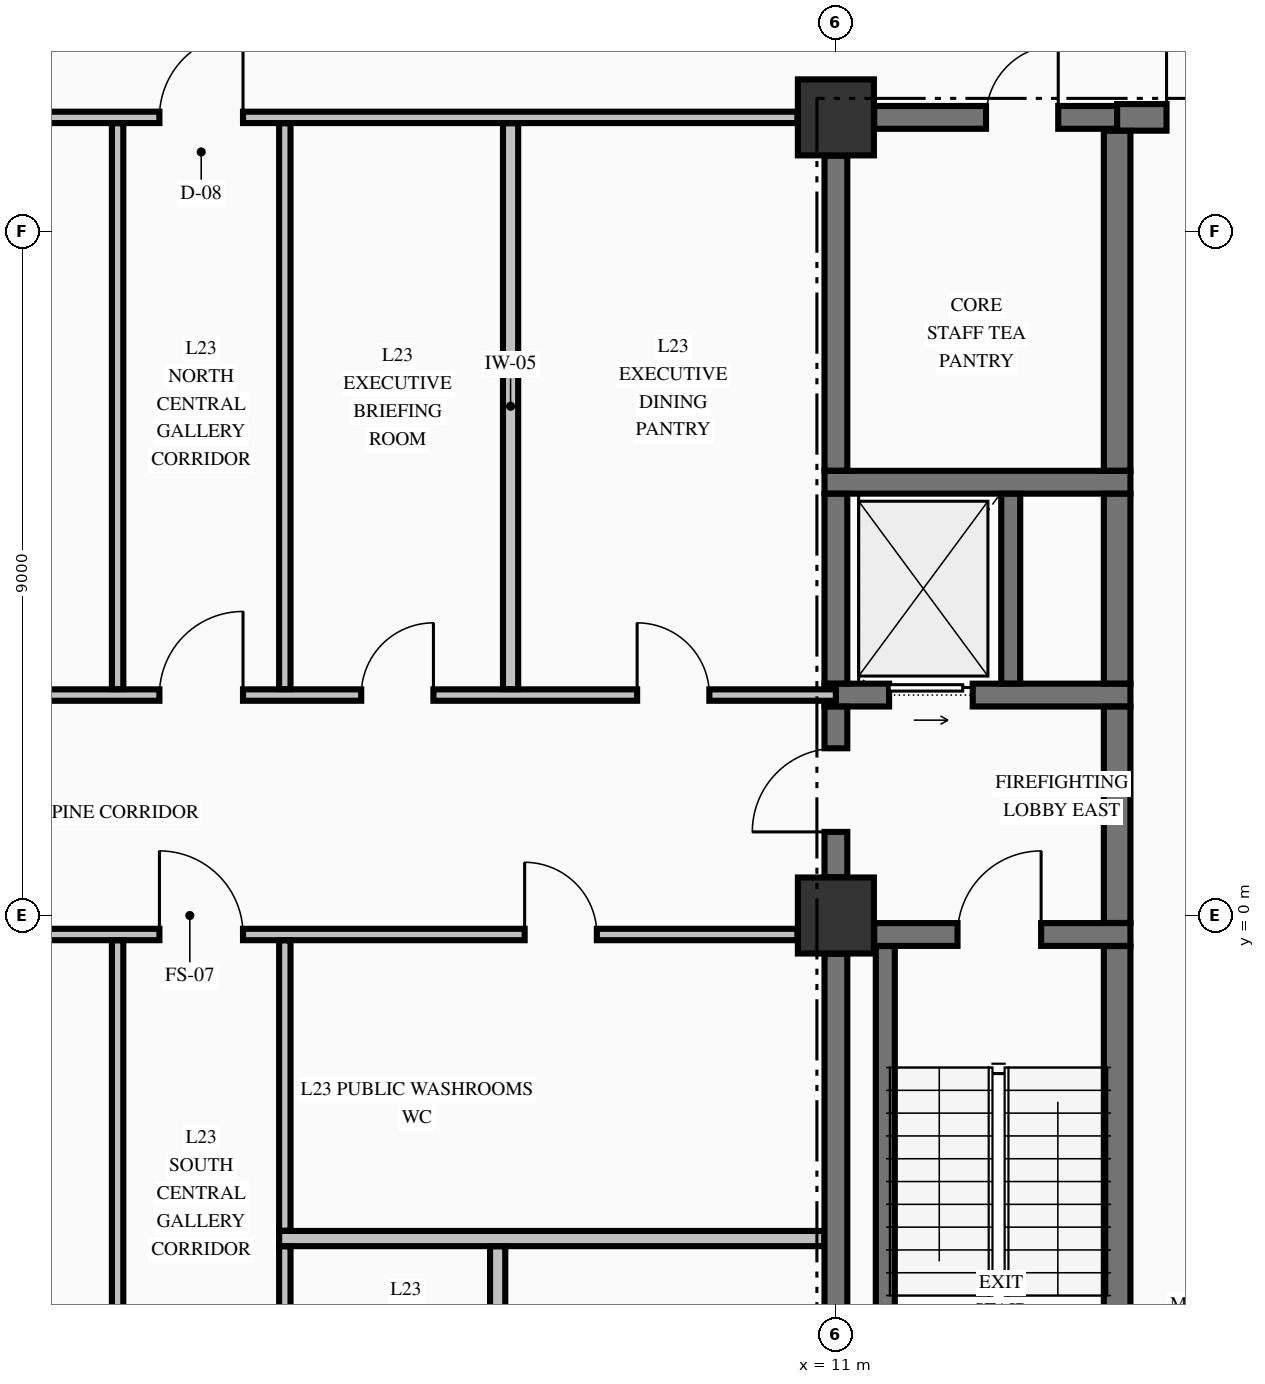
"""IFC4 building model, lengths in metres.
Left out: names, types, materials, properties, quantities, classifications, styles, units other than length and angle.
Written with IfcOpenShell. Run it as: python <this file> out.ifc"""

import sys

from ifc_helpers import new_model, si_unit, direction, frame, frame_2d, origin, origin_2d, place, context, subcontext, project, spatial, rectangle, extrude, element, fill, save


model = new_model("IFC4")
c1 = context("Model", 3, precision=1e-05, world=origin(), true_north=direction((0.0, 1.0)))
c2 = subcontext(c1, "Body", "Model", "MODEL_VIEW")
j1 = project(units=[si_unit("LENGTHUNIT", "METRE"), si_unit("PLANEANGLEUNIT", "RADIAN")], contexts=[c1])
p1 = place(None, origin())
s1 = spatial("IfcSite", under=j1, at=p1, CompositionType="ELEMENT")
p2 = place(p1, origin())
s2 = spatial("IfcBuilding", under=s1, at=p2, CompositionType="ELEMENT")
p3 = place(p2, frame((0.0, 0.0, 94.93)))
s3 = spatial("IfcBuildingStorey", under=s2, at=p3, CompositionType="ELEMENT", Elevation=94.93)
for number, where, z_axis, x_axis in (
    (1, (11.0, 0.0, -0.25), (0.0, 0.0, 1.0), (1.0, 0.0, 0.0)),
    (2, (11.0, 10.5, -0.25), (0.0, 0.0, 1.0), (1.0, 0.0, 0.0)),
):
    element("IfcColumn", number, at=place(p3, frame(where, z_axis=z_axis, x_axis=x_axis)), inside=s3, PredefinedType="COLUMN", context=c2, shape_type="SweptSolid", body=[
        extrude(rectangle(XDim=1.0, YDim=1.0, at=origin_2d()), origin(), (0.0, 0.0, 1.0), 3.545),
    ])
p4 = place(p3, frame((11.504, -0.25, 0.0), z_axis=(0.0, 0.0, 1.0), x_axis=(1.0, 0.0, 0.0)))
e3 = element("IfcWall", 3, at=p4, inside=s3, PredefinedType="SHEAR", context=c2, shape_type="SweptSolid", body=[
    extrude(rectangle(XDim=3.371, YDim=0.3, at=frame_2d((1.686, 0.0))), origin(), (0.0, 0.0, 1.0), 3.295),
])
p5 = place(p4, frame((1.096, 0.0, 0.0)))
e4 = element("IfcOpeningElement", 4, at=p5, cuts=e3, PredefinedType="OPENING", context=c2, shape_type="SweptSolid", body=[
    extrude(rectangle(XDim=1.1, YDim=2.15, at=frame_2d((0.55, 1.075))), frame((0.0, 0.16, 0.0), z_axis=(0.0, -1.0, 0.0), x_axis=(1.0, 0.0, 0.0)), (0.0, 0.0, 1.0), 0.32),
])
p6 = place(p3, frame((10.85, 2.9, 0.0), z_axis=(0.0, 0.0, 1.0), x_axis=(1.0, 0.0, 0.0)))
e5 = element("IfcWall", 5, at=p6, inside=s3, PredefinedType="SHEAR", context=c2, shape_type="SweptSolid", body=[
    extrude(rectangle(XDim=4.025, YDim=0.3, at=frame_2d((2.012, 0.0))), origin(), (0.0, 0.0, 1.0), 3.295),
])
p7 = place(p6, frame((0.85, 0.0, 0.0)))
e6 = element("IfcOpeningElement", 6, at=p7, cuts=e5, PredefinedType="OPENING", context=c2, shape_type="SweptSolid", body=[
    extrude(rectangle(XDim=1.1, YDim=2.2, at=frame_2d((0.55, 1.1))), frame((0.0, 0.16, 0.0), z_axis=(0.0, -1.0, 0.0), x_axis=(1.0, 0.0, 0.0)), (0.0, 0.0, 1.0), 0.32),
])
p8 = place(p3, frame((10.85, 5.7, 0.0), z_axis=(0.0, 0.0, 1.0), x_axis=(1.0, 0.0, 0.0)))
e7 = element("IfcWall", 7, at=p8, inside=s3, PredefinedType="SHEAR", context=c2, shape_type="SweptSolid", body=[
    extrude(rectangle(XDim=4.025, YDim=0.3, at=frame_2d((2.012, 0.0))), origin(), (0.0, 0.0, 1.0), 3.295),
])
p9 = place(p3, frame((11.504, 10.5, 0.0), z_axis=(0.0, 0.0, 1.0), x_axis=(1.0, 0.0, 0.0)))
e8 = element("IfcWall", 8, at=p9, inside=s3, PredefinedType="SHEAR", context=c2, shape_type="SweptSolid", body=[
    extrude(rectangle(XDim=3.196, YDim=0.3, at=frame_2d((1.598, 0.0))), origin(), (0.0, 0.0, 1.0), 3.295),
])
p10 = place(p9, frame((1.471, 0.0, 0.0)))
e9 = element("IfcOpeningElement", 9, at=p10, cuts=e8, PredefinedType="OPENING", context=c2, shape_type="SweptSolid", body=[
    extrude(rectangle(XDim=0.95, YDim=2.15, at=frame_2d((0.475, 1.075))), frame((0.0, 0.16, 0.0), z_axis=(0.0, -1.0, 0.0), x_axis=(1.0, 0.0, 0.0)), (0.0, 0.0, 1.0), 0.32),
])
p11 = place(p3, frame((14.7, 10.5, 0.0), z_axis=(0.0, 0.0, 1.0), x_axis=(1.0, 0.0, 0.0)))
e10 = element("IfcWall", 10, at=p11, inside=s3, PredefinedType="SHEAR", context=c2, shape_type="SweptSolid", body=[
    extrude(rectangle(XDim=4.796, YDim=0.35, at=frame_2d((2.398, 0.0))), origin(), (0.0, 0.0, 1.0), 3.295),
])
p12 = place(p11, frame((0.65, 0.0, 0.0)))
e11 = element("IfcOpeningElement", 11, at=p12, cuts=e10, PredefinedType="OPENING", context=c2, shape_type="SweptSolid", body=[
    extrude(rectangle(XDim=1.2, YDim=2.15, at=frame_2d((0.6, 1.075))), frame((0.0, 0.185, 0.0), z_axis=(0.0, -1.0, 0.0), x_axis=(1.0, 0.0, 0.0)), (0.0, 0.0, 1.0), 0.37),
])
p13 = place(p11, frame((3.225, 0.0, 0.0)))
e12 = element("IfcOpeningElement", 12, at=p13, cuts=e10, PredefinedType="OPENING", context=c2, shape_type="SweptSolid", body=[
    extrude(rectangle(XDim=0.95, YDim=2.15, at=frame_2d((0.475, 1.075))), frame((0.0, 0.185, 0.0), z_axis=(0.0, -1.0, 0.0), x_axis=(1.0, 0.0, 0.0)), (0.0, 0.0, 1.0), 0.37),
])
p14 = place(p3, frame((3.675, -4.25, 0.0), z_axis=(0.0, 0.0, 1.0), x_axis=(1.0, 0.0, 0.0)))
e13 = element("IfcWall", 13, at=p14, inside=s3, PredefinedType="PARTITIONING", context=c2, shape_type="SweptSolid", body=[
    extrude(rectangle(XDim=7.172, YDim=0.2, at=frame_2d((3.586, 0.0))), origin(), (0.0, 0.0, 1.0), 3.295),
])
p15 = place(p3, frame((-10.494, -0.25, 0.0), z_axis=(0.0, 0.0, 1.0), x_axis=(1.0, 0.0, 0.0)))
e14 = element("IfcWall", 14, at=p15, inside=s3, PredefinedType="PARTITIONING", context=c2, shape_type="SweptSolid", body=[
    extrude(rectangle(XDim=20.988, YDim=0.15, at=frame_2d((10.494, 0.0))), origin(), (0.0, 0.0, 1.0), 3.295),
])
p16 = place(p15, frame((12.594, 0.0, 0.0)))
e15 = element("IfcOpeningElement", 15, at=p16, cuts=e14, PredefinedType="OPENING", context=c2, shape_type="SweptSolid", body=[
    extrude(rectangle(XDim=1.1, YDim=2.15, at=frame_2d((0.55, 1.075))), frame((0.0, 0.085, 0.0), z_axis=(0.0, -1.0, 0.0), x_axis=(1.0, 0.0, 0.0)), (0.0, 0.0, 1.0), 0.17),
])
p17 = place(p15, frame((5.249, 0.0, 0.0)))
e16 = element("IfcOpeningElement", 16, at=p17, cuts=e14, PredefinedType="OPENING", context=c2, shape_type="SweptSolid", body=[
    extrude(rectangle(XDim=1.05, YDim=2.15, at=frame_2d((0.525, 1.075))), frame((0.0, 0.085, 0.0), z_axis=(0.0, -1.0, 0.0), x_axis=(1.0, 0.0, 0.0)), (0.0, 0.0, 1.0), 0.17),
])
p18 = place(p15, frame((17.399, 0.0, 0.0)))
e17 = element("IfcOpeningElement", 17, at=p18, cuts=e14, PredefinedType="OPENING", context=c2, shape_type="SweptSolid", body=[
    extrude(rectangle(XDim=0.95, YDim=2.15, at=frame_2d((0.475, 1.075))), frame((0.0, 0.085, 0.0), z_axis=(0.0, -1.0, 0.0), x_axis=(1.0, 0.0, 0.0)), (0.0, 0.0, 1.0), 0.17),
])
p19 = place(p3, frame((-11.0, 2.9, 0.0), z_axis=(0.0, 0.0, 1.0), x_axis=(1.0, 0.0, 0.0)))
e18 = element("IfcWall", 18, at=p19, inside=s3, PredefinedType="PARTITIONING", context=c2, shape_type="SweptSolid", body=[
    extrude(rectangle(XDim=22.0, YDim=0.15, at=frame_2d((11.0, 0.0))), origin(), (0.0, 0.0, 1.0), 3.295),
])
p20 = place(p19, frame((13.1, 0.0, 0.0)))
e19 = element("IfcOpeningElement", 19, at=p20, cuts=e18, PredefinedType="OPENING", context=c2, shape_type="SweptSolid", body=[
    extrude(rectangle(XDim=1.1, YDim=2.15, at=frame_2d((0.55, 1.075))), frame((0.0, 0.085, 0.0), z_axis=(0.0, -1.0, 0.0), x_axis=(1.0, 0.0, 0.0)), (0.0, 0.0, 1.0), 0.17),
])
p21 = place(p19, frame((5.755, 0.0, 0.0)))
e20 = element("IfcOpeningElement", 20, at=p21, cuts=e18, PredefinedType="OPENING", context=c2, shape_type="SweptSolid", body=[
    extrude(rectangle(XDim=1.05, YDim=2.15, at=frame_2d((0.525, 1.075))), frame((0.0, 0.085, 0.0), z_axis=(0.0, -1.0, 0.0), x_axis=(1.0, 0.0, 0.0)), (0.0, 0.0, 1.0), 0.17),
])
p22 = place(p19, frame((15.755, 0.0, 0.0)))
e21 = element("IfcOpeningElement", 21, at=p22, cuts=e18, PredefinedType="OPENING", context=c2, shape_type="SweptSolid", body=[
    extrude(rectangle(XDim=0.95, YDim=2.15, at=frame_2d((0.475, 1.075))), frame((0.0, 0.085, 0.0), z_axis=(0.0, -1.0, 0.0), x_axis=(1.0, 0.0, 0.0)), (0.0, 0.0, 1.0), 0.17),
])
p23 = place(p19, frame((19.385, 0.0, 0.0)))
e22 = element("IfcOpeningElement", 22, at=p23, cuts=e18, PredefinedType="OPENING", context=c2, shape_type="SweptSolid", body=[
    extrude(rectangle(XDim=0.95, YDim=2.15, at=frame_2d((0.475, 1.075))), frame((0.0, 0.085, 0.0), z_axis=(0.0, -1.0, 0.0), x_axis=(1.0, 0.0, 0.0)), (0.0, 0.0, 1.0), 0.17),
])
p24 = place(p3, frame((-10.494, 10.5, 0.0), z_axis=(0.0, 0.0, 1.0), x_axis=(1.0, 0.0, 0.0)))
e23 = element("IfcWall", 23, at=p24, inside=s3, PredefinedType="PARTITIONING", context=c2, shape_type="SweptSolid", body=[
    extrude(rectangle(XDim=20.988, YDim=0.15, at=frame_2d((10.494, 0.0))), origin(), (0.0, 0.0, 1.0), 3.295),
])
p25 = place(p24, frame((12.594, 0.0, 0.0)))
e24 = element("IfcOpeningElement", 24, at=p25, cuts=e23, PredefinedType="OPENING", context=c2, shape_type="SweptSolid", body=[
    extrude(rectangle(XDim=1.1, YDim=2.15, at=frame_2d((0.55, 1.075))), frame((0.0, 0.085, 0.0), z_axis=(0.0, -1.0, 0.0), x_axis=(1.0, 0.0, 0.0)), (0.0, 0.0, 1.0), 0.17),
])
p26 = place(p3, frame((11.0, -9.446, 0.0), z_axis=(0.0, 0.0, 1.0), x_axis=(0.0, 1.0, 0.0)))
e25 = element("IfcWall", 25, at=p26, inside=s3, PredefinedType="SHEAR", context=c2, shape_type="SweptSolid", body=[
    extrude(rectangle(XDim=8.942, YDim=0.3, at=frame_2d((4.471, 0.0))), origin(), (0.0, 0.0, 1.0), 3.295),
])
p27 = place(p3, frame((11.0, 0.504, 0.0), z_axis=(0.0, 0.0, 1.0), x_axis=(0.0, 1.0, 0.0)))
e26 = element("IfcWall", 26, at=p27, inside=s3, PredefinedType="SHEAR", context=c2, shape_type="SweptSolid", body=[
    extrude(rectangle(XDim=2.244, YDim=0.3, at=frame_2d((1.122, 0.0))), origin(), (0.0, 0.0, 1.0), 3.295),
])
p28 = place(p27, frame((0.596, 0.0, 0.0)))
e27 = element("IfcOpeningElement", 27, at=p28, cuts=e26, PredefinedType="OPENING", context=c2, shape_type="SweptSolid", body=[
    extrude(rectangle(XDim=1.1, YDim=2.15, at=frame_2d((0.55, 1.075))), frame((0.0, 0.16, 0.0), z_axis=(0.0, -1.0, 0.0), x_axis=(1.0, 0.0, 0.0)), (0.0, 0.0, 1.0), 0.32),
])
p29 = place(p3, frame((11.0, 3.052, 0.0), z_axis=(0.0, 0.0, 1.0), x_axis=(0.0, 1.0, 0.0)))
e28 = element("IfcWall", 28, at=p29, inside=s3, PredefinedType="SHEAR", context=c2, shape_type="SweptSolid", body=[
    extrude(rectangle(XDim=2.496, YDim=0.3, at=frame_2d((1.248, 0.0))), origin(), (0.0, 0.0, 1.0), 3.295),
])
p30 = place(p3, frame((11.0, 5.852, 0.0), z_axis=(0.0, 0.0, 1.0), x_axis=(0.0, 1.0, 0.0)))
e29 = element("IfcWall", 29, at=p30, inside=s3, PredefinedType="SHEAR", context=c2, shape_type="SweptSolid", body=[
    extrude(rectangle(XDim=4.144, YDim=0.3, at=frame_2d((2.072, 0.0))), origin(), (0.0, 0.0, 1.0), 3.295),
])
p31 = place(p3, frame((11.65, -9.798, 0.0), z_axis=(0.0, 0.0, 1.0), x_axis=(0.0, 1.0, 0.0)))
e30 = element("IfcWall", 30, at=p31, inside=s3, PredefinedType="SOLIDWALL", context=c2, shape_type="SweptSolid", body=[
    extrude(rectangle(XDim=9.396, YDim=0.25, at=frame_2d((4.698, 0.0))), origin(), (0.0, 0.0, 1.0), 3.295),
])
p32 = place(p3, frame((13.3, 3.052, 0.0), z_axis=(0.0, 0.0, 1.0), x_axis=(0.0, 1.0, 0.0)))
e31 = element("IfcWall", 31, at=p32, inside=s3, PredefinedType="SOLIDWALL", context=c2, shape_type="SweptSolid", body=[
    extrude(rectangle(XDim=2.496, YDim=0.25, at=frame_2d((1.248, 0.0))), origin(), (0.0, 0.0, 1.0), 3.295),
])
p33 = place(p3, frame((14.7, -9.773, 0.0), z_axis=(0.0, 0.0, 1.0), x_axis=(0.0, 1.0, 0.0)))
e32 = element("IfcWall", 32, at=p33, inside=s3, PredefinedType="SHEAR", context=c2, shape_type="SweptSolid", body=[
    extrude(rectangle(XDim=9.371, YDim=0.35, at=frame_2d((4.686, 0.0))), origin(), (0.0, 0.0, 1.0), 3.295),
])
p34 = place(p3, frame((14.7, -0.098, 0.0), z_axis=(0.0, 0.0, 1.0), x_axis=(0.0, 1.0, 0.0)))
e33 = element("IfcWall", 33, at=p34, inside=s3, PredefinedType="SHEAR", context=c2, shape_type="SweptSolid", body=[
    extrude(rectangle(XDim=2.846, YDim=0.35, at=frame_2d((1.423, 0.0))), origin(), (0.0, 0.0, 1.0), 3.295),
])
p35 = place(p3, frame((14.7, 3.052, 0.0), z_axis=(0.0, 0.0, 1.0), x_axis=(0.0, 1.0, 0.0)))
e34 = element("IfcWall", 34, at=p35, inside=s3, PredefinedType="SHEAR", context=c2, shape_type="SweptSolid", body=[
    extrude(rectangle(XDim=2.496, YDim=0.35, at=frame_2d((1.248, 0.0))), origin(), (0.0, 0.0, 1.0), 3.295),
])
p36 = place(p3, frame((14.7, 5.852, 0.0), z_axis=(0.0, 0.0, 1.0), x_axis=(0.0, 1.0, 0.0)))
e35 = element("IfcWall", 35, at=p36, inside=s3, PredefinedType="SHEAR", context=c2, shape_type="SweptSolid", body=[
    extrude(rectangle(XDim=4.471, YDim=0.35, at=frame_2d((2.235, 0.0))), origin(), (0.0, 0.0, 1.0), 3.295),
])
p37 = place(p3, frame((1.55, -9.872, 0.0), z_axis=(0.0, 0.0, 1.0), x_axis=(0.0, 1.0, 0.0)))
e36 = element("IfcWall", 36, at=p37, inside=s3, PredefinedType="PARTITIONING", context=c2, shape_type="SweptSolid", body=[
    extrude(rectangle(XDim=9.544, YDim=0.15, at=frame_2d((4.772, 0.0))), origin(), (0.0, 0.0, 1.0), 3.295),
])
p38 = place(p3, frame((1.55, 2.978, 0.0), z_axis=(0.0, 0.0, 1.0), x_axis=(0.0, 1.0, 0.0)))
e37 = element("IfcWall", 37, at=p38, inside=s3, PredefinedType="PARTITIONING", context=c2, shape_type="SweptSolid", body=[
    extrude(rectangle(XDim=7.444, YDim=0.15, at=frame_2d((3.722, 0.0))), origin(), (0.0, 0.0, 1.0), 3.295),
])
p39 = place(p3, frame((3.75, -9.872, 0.0), z_axis=(0.0, 0.0, 1.0), x_axis=(0.0, 1.0, 0.0)))
e38 = element("IfcWall", 38, at=p39, inside=s3, PredefinedType="PARTITIONING", context=c2, shape_type="SweptSolid", body=[
    extrude(rectangle(XDim=5.519, YDim=0.15, at=frame_2d((2.76, 0.0))), origin(), (0.0, 0.0, 1.0), 3.295),
])
p40 = place(p39, frame((1.997, 0.0, 0.0)))
e39 = element("IfcOpeningElement", 39, at=p40, cuts=e38, PredefinedType="OPENING", context=c2, shape_type="SweptSolid", body=[
    extrude(rectangle(XDim=0.95, YDim=2.15, at=frame_2d((0.475, 1.075))), frame((0.0, 0.085, 0.0), z_axis=(0.0, -1.0, 0.0), x_axis=(1.0, 0.0, 0.0)), (0.0, 0.0, 1.0), 0.17),
])
p41 = place(p3, frame((3.75, -4.147, 0.0), z_axis=(0.0, 0.0, 1.0), x_axis=(0.0, 1.0, 0.0)))
e40 = element("IfcWall", 40, at=p41, inside=s3, PredefinedType="PARTITIONING", context=c2, shape_type="SweptSolid", body=[
    extrude(rectangle(XDim=3.819, YDim=0.15, at=frame_2d((1.91, 0.0))), origin(), (0.0, 0.0, 1.0), 3.295),
])
p42 = place(p3, frame((3.75, 2.978, 0.0), z_axis=(0.0, 0.0, 1.0), x_axis=(0.0, 1.0, 0.0)))
e41 = element("IfcWall", 41, at=p42, inside=s3, PredefinedType="PARTITIONING", context=c2, shape_type="SweptSolid", body=[
    extrude(rectangle(XDim=7.444, YDim=0.15, at=frame_2d((3.722, 0.0))), origin(), (0.0, 0.0, 1.0), 3.295),
])
p43 = place(p3, frame((6.55, -9.872, 0.0), z_axis=(0.0, 0.0, 1.0), x_axis=(0.0, 1.0, 0.0)))
e42 = element("IfcWall", 42, at=p43, inside=s3, PredefinedType="PARTITIONING", context=c2, shape_type="SweptSolid", body=[
    extrude(rectangle(XDim=5.519, YDim=0.2, at=frame_2d((2.76, 0.0))), origin(), (0.0, 0.0, 1.0), 3.295),
])
p44 = place(p3, frame((6.72, 2.978, 0.0), z_axis=(0.0, 0.0, 1.0), x_axis=(0.0, 1.0, 0.0)))
e43 = element("IfcWall", 43, at=p44, inside=s3, PredefinedType="PARTITIONING", context=c2, shape_type="SweptSolid", body=[
    extrude(rectangle(XDim=7.444, YDim=0.2, at=frame_2d((3.722, 0.0))), origin(), (0.0, 0.0, 1.0), 3.295),
])
p45 = place(p5, origin())
e44 = element("IfcDoor", 44, at=p45, inside=s3, OperationType="SINGLE_SWING_RIGHT", PredefinedType="DOOR", context=c2, shape_type="SweptSolid", body=[
    extrude(rectangle(XDim=1.1, YDim=2.15, at=frame_2d((0.55, 1.075))), frame((0.0, 0.025, 0.0), z_axis=(0.0, -1.0, 0.0), x_axis=(1.0, 0.0, 0.0)), (0.0, 0.0, 1.0), 0.05),
])
fill(e4, e44)
p46 = place(p28, origin())
e45 = element("IfcDoor", 45, at=p46, inside=s3, OperationType="SINGLE_SWING_LEFT", PredefinedType="DOOR", context=c2, shape_type="SweptSolid", body=[
    extrude(rectangle(XDim=1.1, YDim=2.15, at=frame_2d((0.55, 1.075))), frame((0.0, 0.025, 0.0), z_axis=(0.0, -1.0, 0.0), x_axis=(1.0, 0.0, 0.0)), (0.0, 0.0, 1.0), 0.05),
])
fill(e27, e45)
p47 = place(p7, origin())
e46 = element("IfcDoor", 46, at=p47, inside=s3, OperationType="SLIDING_TO_RIGHT", PredefinedType="DOOR", context=c2, shape_type="SweptSolid", body=[
    extrude(rectangle(XDim=1.1, YDim=2.2, at=frame_2d((0.55, 1.1))), frame((0.0, 0.025, 0.0), z_axis=(0.0, -1.0, 0.0), x_axis=(1.0, 0.0, 0.0)), (0.0, 0.0, 1.0), 0.05),
])
fill(e6, e46)
p48 = place(p10, origin())
e47 = element("IfcDoor", 47, at=p48, inside=s3, OperationType="SINGLE_SWING_RIGHT", PredefinedType="DOOR", context=c2, shape_type="SweptSolid", body=[
    extrude(rectangle(XDim=0.95, YDim=2.15, at=frame_2d((0.475, 1.075))), frame((0.0, 0.025, 0.0), z_axis=(0.0, -1.0, 0.0), x_axis=(1.0, 0.0, 0.0)), (0.0, 0.0, 1.0), 0.05),
])
fill(e9, e47)
p49 = place(p12, origin())
e48 = element("IfcDoor", 48, at=p49, inside=s3, OperationType="SINGLE_SWING_LEFT", PredefinedType="DOOR", context=c2, shape_type="SweptSolid", body=[
    extrude(rectangle(XDim=1.2, YDim=2.15, at=frame_2d((0.6, 1.075))), frame((0.0, 0.025, 0.0), z_axis=(0.0, -1.0, 0.0), x_axis=(1.0, 0.0, 0.0)), (0.0, 0.0, 1.0), 0.05),
])
fill(e11, e48)
p50 = place(p25, origin())
e49 = element("IfcDoor", 49, at=p50, inside=s3, OperationType="SINGLE_SWING_RIGHT", PredefinedType="DOOR", context=c2, shape_type="SweptSolid", body=[
    extrude(rectangle(XDim=1.1, YDim=2.15, at=frame_2d((0.55, 1.075))), frame((0.0, 0.025, 0.0), z_axis=(0.0, -1.0, 0.0), x_axis=(1.0, 0.0, 0.0)), (0.0, 0.0, 1.0), 0.05),
])
fill(e24, e49)
p51 = place(p20, origin())
e50 = element("IfcDoor", 50, at=p51, inside=s3, OperationType="SINGLE_SWING_RIGHT", PredefinedType="DOOR", context=c2, shape_type="SweptSolid", body=[
    extrude(rectangle(XDim=1.1, YDim=2.15, at=frame_2d((0.55, 1.075))), frame((0.0, 0.025, 0.0), z_axis=(0.0, -1.0, 0.0), x_axis=(1.0, 0.0, 0.0)), (0.0, 0.0, 1.0), 0.05),
])
fill(e19, e50)
p52 = place(p16, origin())
e51 = element("IfcDoor", 51, at=p52, inside=s3, OperationType="SINGLE_SWING_LEFT", PredefinedType="DOOR", context=c2, shape_type="SweptSolid", body=[
    extrude(rectangle(XDim=1.1, YDim=2.15, at=frame_2d((0.55, 1.075))), frame((0.0, 0.025, 0.0), z_axis=(0.0, -1.0, 0.0), x_axis=(1.0, 0.0, 0.0)), (0.0, 0.0, 1.0), 0.05),
])
fill(e15, e51)
p53 = place(p22, origin())
e52 = element("IfcDoor", 52, at=p53, inside=s3, OperationType="SINGLE_SWING_RIGHT", PredefinedType="DOOR", context=c2, shape_type="SweptSolid", body=[
    extrude(rectangle(XDim=0.95, YDim=2.15, at=frame_2d((0.475, 1.075))), frame((0.0, 0.025, 0.0), z_axis=(0.0, -1.0, 0.0), x_axis=(1.0, 0.0, 0.0)), (0.0, 0.0, 1.0), 0.05),
])
fill(e21, e52)
p54 = place(p23, origin())
e53 = element("IfcDoor", 53, at=p54, inside=s3, OperationType="SINGLE_SWING_LEFT", PredefinedType="DOOR", context=c2, shape_type="SweptSolid", body=[
    extrude(rectangle(XDim=0.95, YDim=2.15, at=frame_2d((0.475, 1.075))), frame((0.0, 0.025, 0.0), z_axis=(0.0, -1.0, 0.0), x_axis=(1.0, 0.0, 0.0)), (0.0, 0.0, 1.0), 0.05),
])
fill(e22, e53)
p55 = place(p18, origin())
e54 = element("IfcDoor", 54, at=p55, inside=s3, OperationType="SINGLE_SWING_LEFT", PredefinedType="DOOR", context=c2, shape_type="SweptSolid", body=[
    extrude(rectangle(XDim=0.95, YDim=2.15, at=frame_2d((0.475, 1.075))), frame((0.0, 0.025, 0.0), z_axis=(0.0, -1.0, 0.0), x_axis=(1.0, 0.0, 0.0)), (0.0, 0.0, 1.0), 0.05),
])
fill(e17, e54)
save(model, sys.argv[1])
